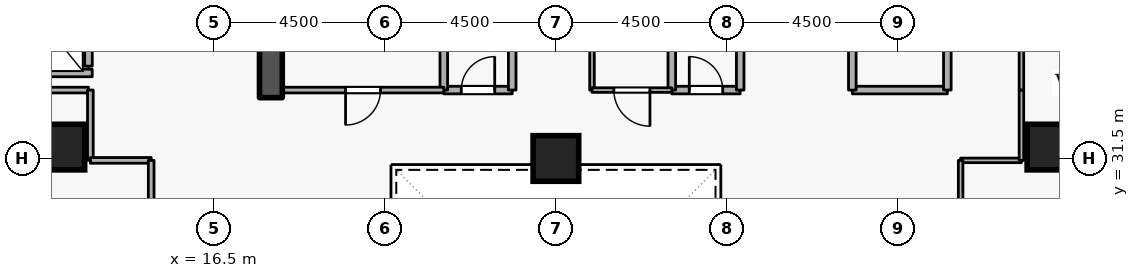
"""IFC4 building model, lengths in metres.
Left out: names, types, materials, properties, quantities, classifications, styles, units other than length and angle.
Written with IfcOpenShell. Run it as: python <this file> out.ifc"""

import sys

from ifc_helpers import new_model, si_unit, direction, frame, frame_2d, origin, origin_2d, place, context, subcontext, project, spatial, rectangle, extrude, element, fill, save


model = new_model("IFC4")
c1 = context("Model", 3, precision=1e-05, world=origin(), true_north=direction((0.0, 1.0)))
c2 = subcontext(c1, "Body", "Model", "MODEL_VIEW")
j1 = project(units=[si_unit("LENGTHUNIT", "METRE"), si_unit("PLANEANGLEUNIT", "RADIAN")], contexts=[c1])
p1 = place(None, origin())
s1 = spatial("IfcSite", under=j1, at=p1, CompositionType="ELEMENT")
p2 = place(p1, origin())
s2 = spatial("IfcBuilding", under=s1, at=p2, CompositionType="ELEMENT")
p3 = place(p2, frame((0.0, 0.0, 75.9)))
s3 = spatial("IfcBuildingStorey", under=s2, at=p3, CompositionType="ELEMENT", Elevation=75.9)
p4 = place(p3, frame((18.0, 33.1, 0.0), z_axis=(0.0, 0.0, 1.0), x_axis=(0.0, 1.0, 0.0)))
e1 = element("IfcWall", 1, at=p4, inside=s3, PredefinedType="SHEAR", context=c2, shape_type="SweptSolid", body=[
    extrude(rectangle(XDim=5.7, YDim=0.6, at=frame_2d((2.85, 0.0))), origin(), (0.0, 0.0, 1.0), 4.2),
])
for number, where, z_axis, x_axis in (
    (2, (12.5, 31.8, 0.0), (0.0, 0.0, 1.0), (1.0, 0.0, 0.0)),
    (3, (38.5, 31.8, 0.0), (0.0, 0.0, 1.0), (1.0, 0.0, 0.0)),
    (4, (25.5, 31.5, 0.0), (0.0, 0.0, 1.0), (1.0, 0.0, 0.0)),
):
    element("IfcColumn", number, at=place(p3, frame(where, z_axis=z_axis, x_axis=x_axis)), inside=s3, PredefinedType="COLUMN", context=c2, shape_type="SweptSolid", body=[
        extrude(rectangle(XDim=1.2, YDim=1.2, at=origin_2d()), origin(), (0.0, 0.0, 1.0), 4.2),
    ])
p5 = place(p3, frame((13.2, 33.93, 0.0), z_axis=(0.0, 0.0, 1.0), x_axis=(0.0, 1.0, 0.0)))
e5 = element("IfcWall", 5, at=p5, inside=s3, PredefinedType="STANDARD", context=c2, shape_type="SweptSolid", body=[
    extrude(rectangle(XDim=1.94, YDim=0.2, at=frame_2d((0.97, 0.0))), origin(), (0.0, 0.0, 1.0), 3.94),
])
p6 = place(p5, frame((0.46, 0.0, 0.0)))
e6 = element("IfcOpeningElement", 6, at=p6, cuts=e5, PredefinedType="OPENING", context=c2, shape_type="SweptSolid", body=[
    extrude(rectangle(XDim=1.02, YDim=2.06, at=frame_2d((0.51, 1.03))), frame((0.0, 0.11, 0.0), z_axis=(0.0, -1.0, 0.0), x_axis=(1.0, 0.0, 0.0)), (0.0, 0.0, 1.0), 0.22),
])
p7 = place(p3, frame((11.002, 33.75, 0.0), z_axis=(0.0, 0.0, 1.0), x_axis=(1.0, 0.0, 0.0)))
e7 = element("IfcWall", 7, at=p7, inside=s3, PredefinedType="STANDARD", context=c2, shape_type="SweptSolid", body=[
    extrude(rectangle(XDim=2.296, YDim=0.2, at=frame_2d((1.148, 0.0))), origin(), (0.0, 0.0, 1.0), 3.94),
])
p8 = place(p3, frame((33.3, 33.3, 0.0), z_axis=(0.0, 0.0, 1.0), x_axis=(1.0, 0.0, 0.0)))
e8 = element("IfcWall", 8, at=p8, inside=s3, PredefinedType="STANDARD", context=c2, shape_type="SweptSolid", body=[
    extrude(rectangle(XDim=2.5, YDim=0.2, at=frame_2d((1.25, 0.0))), origin(), (0.0, 0.0, 1.0), 3.94),
])
p9 = place(p3, frame((35.8, 33.3, 0.0), z_axis=(0.0, 0.0, 1.0), x_axis=(0.0, 1.0, 0.0)))
e9 = element("IfcWall", 9, at=p9, inside=s3, PredefinedType="STANDARD", context=c2, shape_type="SweptSolid", body=[
    extrude(rectangle(XDim=5.7, YDim=0.2, at=frame_2d((2.85, 0.0))), origin(), (0.0, 0.0, 1.0), 3.94),
])
p10 = place(p9, frame((2.275, 0.0, 0.0)))
e10 = element("IfcOpeningElement", 10, at=p10, cuts=e9, PredefinedType="OPENING", context=c2, shape_type="SweptSolid", body=[
    extrude(rectangle(XDim=1.15, YDim=2.1, at=frame_2d((0.575, 1.05))), frame((0.0, 0.11, 0.0), z_axis=(0.0, -1.0, 0.0), x_axis=(1.0, 0.0, 0.0)), (0.0, 0.0, 1.0), 0.22),
])
p11 = place(p3, frame((33.3, 35.6, 0.0), z_axis=(0.0, 0.0, 1.0), x_axis=(0.0, -1.0, 0.0)))
e11 = element("IfcWall", 11, at=p11, inside=s3, PredefinedType="STANDARD", context=c2, shape_type="SweptSolid", body=[
    extrude(rectangle(XDim=2.3, YDim=0.2, at=frame_2d((1.15, 0.0))), origin(), (0.0, 0.0, 1.0), 3.145),
])
p12 = place(p3, frame((22.55, 33.3, 0.0), z_axis=(0.0, 0.0, 1.0), x_axis=(1.0, 0.0, 0.0)))
e12 = element("IfcWall", 12, at=p12, inside=s3, PredefinedType="STANDARD", context=c2, shape_type="SweptSolid", body=[
    extrude(rectangle(XDim=1.8, YDim=0.2, at=frame_2d((0.9, 0.0))), origin(), (0.0, 0.0, 1.0), 3.94),
])
p13 = place(p12, frame((0.46, 0.0, 0.0)))
e13 = element("IfcOpeningElement", 13, at=p13, cuts=e12, PredefinedType="OPENING", context=c2, shape_type="SweptSolid", body=[
    extrude(rectangle(XDim=0.88, YDim=2.04, at=frame_2d((0.44, 1.02))), frame((0.0, 0.11, 0.0), z_axis=(0.0, -1.0, 0.0), x_axis=(1.0, 0.0, 0.0)), (0.0, 0.0, 1.0), 0.22),
])
for number, where, z_axis, x_axis in (
    (14, (24.35, 33.3, 0.0), (0.0, 0.0, 1.0), (0.0, 1.0, 0.0)),
    (15, (22.55, 35.35, 0.0), (0.0, 0.0, 1.0), (0.0, -1.0, 0.0)),
):
    element("IfcWall", number, at=place(p3, frame(where, z_axis=z_axis, x_axis=x_axis)), inside=s3, PredefinedType="STANDARD", context=c2, shape_type="SweptSolid", body=[
        extrude(rectangle(XDim=2.05, YDim=0.2, at=frame_2d((1.025, 0.0))), origin(), (0.0, 0.0, 1.0), 3.94),
    ])
p14 = place(p3, frame((28.55, 33.3, 0.0), z_axis=(0.0, 0.0, 1.0), x_axis=(1.0, 0.0, 0.0)))
e16 = element("IfcWall", 16, at=p14, inside=s3, PredefinedType="STANDARD", context=c2, shape_type="SweptSolid", body=[
    extrude(rectangle(XDim=1.8, YDim=0.2, at=frame_2d((0.9, 0.0))), origin(), (0.0, 0.0, 1.0), 3.94),
])
p15 = place(p14, frame((0.46, 0.0, 0.0)))
e17 = element("IfcOpeningElement", 17, at=p15, cuts=e16, PredefinedType="OPENING", context=c2, shape_type="SweptSolid", body=[
    extrude(rectangle(XDim=0.88, YDim=2.04, at=frame_2d((0.44, 1.02))), frame((0.0, 0.11, 0.0), z_axis=(0.0, -1.0, 0.0), x_axis=(1.0, 0.0, 0.0)), (0.0, 0.0, 1.0), 0.22),
])
for number, where, z_axis, x_axis in (
    (18, (30.35, 33.3, 0.0), (0.0, 0.0, 1.0), (0.0, 1.0, 0.0)),
    (19, (28.55, 35.35, 0.0), (0.0, 0.0, 1.0), (0.0, -1.0, 0.0)),
):
    element("IfcWall", number, at=place(p3, frame(where, z_axis=z_axis, x_axis=x_axis)), inside=s3, PredefinedType="STANDARD", context=c2, shape_type="SweptSolid", body=[
        extrude(rectangle(XDim=2.05, YDim=0.2, at=frame_2d((1.025, 0.0))), origin(), (0.0, 0.0, 1.0), 3.94),
    ])
p16 = place(p3, frame((22.55, 33.3, 0.0), z_axis=(0.0, 0.0, 1.0), x_axis=(-1.0, 0.0, 0.0)))
e20 = element("IfcWall", 20, at=p16, inside=s3, PredefinedType="PARTITIONING", context=c2, shape_type="SweptSolid", body=[
    extrude(rectangle(XDim=4.25, YDim=0.15, at=frame_2d((2.125, 0.0))), origin(), (0.0, 0.0, 1.0), 3.94),
])
p17 = place(p16, frame((1.665, 0.0, 0.0)))
e21 = element("IfcOpeningElement", 21, at=p17, cuts=e20, PredefinedType="OPENING", context=c2, shape_type="SweptSolid", body=[
    extrude(rectangle(XDim=0.92, YDim=2.08, at=frame_2d((0.46, 1.04))), frame((0.0, 0.085, 0.0), z_axis=(0.0, -1.0, 0.0), x_axis=(1.0, 0.0, 0.0)), (0.0, 0.0, 1.0), 0.17),
])
p18 = place(p3, frame((26.45, 33.3, 0.0), z_axis=(0.0, 0.0, 1.0), x_axis=(0.0, 1.0, 0.0)))
e22 = element("IfcWall", 22, at=p18, inside=s3, PredefinedType="PARTITIONING", context=c2, shape_type="SweptSolid", body=[
    extrude(rectangle(XDim=2.05, YDim=0.12, at=frame_2d((1.025, 0.0))), origin(), (0.0, 0.0, 1.0), 3.94),
])
p19 = place(p3, frame((28.55, 33.3, 0.0), z_axis=(0.0, 0.0, 1.0), x_axis=(-1.0, 0.0, 0.0)))
e23 = element("IfcWall", 23, at=p19, inside=s3, PredefinedType="PARTITIONING", context=c2, shape_type="SweptSolid", body=[
    extrude(rectangle(XDim=2.1, YDim=0.12, at=frame_2d((1.05, 0.0))), origin(), (0.0, 0.0, 1.0), 3.94),
])
p20 = place(p19, frame((0.575, 0.0, 0.0)))
e24 = element("IfcOpeningElement", 24, at=p20, cuts=e23, PredefinedType="OPENING", context=c2, shape_type="SweptSolid", body=[
    extrude(rectangle(XDim=0.95, YDim=2.1, at=frame_2d((0.475, 1.05))), frame((0.0, 0.07, 0.0), z_axis=(0.0, -1.0, 0.0), x_axis=(1.0, 0.0, 0.0)), (0.0, 0.0, 1.0), 0.14),
])
p21 = place(p3, frame((10.9, 33.3, 0.0), z_axis=(0.0, 0.0, 1.0), x_axis=(1.0, 0.0, 0.0)))
e25 = element("IfcWall", 25, at=p21, inside=s3, PredefinedType="PARTITIONING", context=c2, shape_type="SweptSolid", body=[
    extrude(rectangle(XDim=2.3, YDim=0.15, at=frame_2d((1.15, 0.0))), origin(), (0.0, 0.0, 1.0), 3.94),
])
p22 = place(p3, frame((13.25, 33.3, 0.0), z_axis=(0.0, 0.0, 1.0), x_axis=(0.0, -1.0, 0.0)))
e26 = element("IfcWall", 26, at=p22, inside=s3, PredefinedType="PARTITIONING", context=c2, shape_type="SweptSolid", body=[
    extrude(rectangle(XDim=1.85, YDim=0.15, at=frame_2d((0.925, 0.0))), origin(), (0.0, 0.0, 1.0), 3.94),
])
p23 = place(p3, frame((13.25, 31.45, 0.0), z_axis=(0.0, 0.0, 1.0), x_axis=(1.0, 0.0, 0.0)))
e27 = element("IfcWall", 27, at=p23, inside=s3, PredefinedType="PARTITIONING", context=c2, shape_type="SweptSolid", body=[
    extrude(rectangle(XDim=1.6, YDim=0.15, at=frame_2d((0.8, 0.0))), origin(), (0.0, 0.0, 1.0), 3.94),
])
p24 = place(p3, frame((14.85, 31.45, 0.0), z_axis=(0.0, 0.0, 1.0), x_axis=(0.0, -1.0, 0.0)))
e28 = element("IfcWall", 28, at=p24, inside=s3, PredefinedType="PARTITIONING", context=c2, shape_type="SweptSolid", body=[
    extrude(rectangle(XDim=4.45, YDim=0.15, at=frame_2d((2.225, 0.0))), origin(), (0.0, 0.0, 1.0), 3.94),
])
p25 = place(p24, frame((1.575, 0.0, 0.0)))
e29 = element("IfcOpeningElement", 29, at=p25, cuts=e28, PredefinedType="OPENING", context=c2, shape_type="SweptSolid", body=[
    extrude(rectangle(XDim=1.3, YDim=2.12, at=frame_2d((0.65, 1.06))), frame((0.0, 0.085, 0.0), z_axis=(0.0, -1.0, 0.0), x_axis=(1.0, 0.0, 0.0)), (0.0, 0.0, 1.0), 0.17),
])
p26 = place(p3, frame((36.15, 31.45, 0.0), z_axis=(0.0, 0.0, 1.0), x_axis=(1.0, 0.0, 0.0)))
e30 = element("IfcWall", 30, at=p26, inside=s3, PredefinedType="PARTITIONING", context=c2, shape_type="SweptSolid", body=[
    extrude(rectangle(XDim=1.6, YDim=0.12, at=frame_2d((0.8, 0.0))), origin(), (0.0, 0.0, 1.0), 3.94),
])
p27 = place(p3, frame((37.75, 31.45, 0.0), z_axis=(0.0, 0.0, 1.0), x_axis=(0.0, 1.0, 0.0)))
e31 = element("IfcWall", 31, at=p27, inside=s3, PredefinedType="PARTITIONING", context=c2, shape_type="SweptSolid", body=[
    extrude(rectangle(XDim=1.85, YDim=0.12, at=frame_2d((0.925, 0.0))), origin(), (0.0, 0.0, 1.0), 3.94),
])
p28 = place(p3, frame((37.75, 33.3, 0.0), z_axis=(0.0, 0.0, 1.0), x_axis=(0.0, 1.0, 0.0)))
e32 = element("IfcWall", 32, at=p28, inside=s3, PredefinedType="PARTITIONING", context=c2, shape_type="SweptSolid", body=[
    extrude(rectangle(XDim=9.35, YDim=0.12, at=frame_2d((4.675, 0.0))), origin(), (0.0, 0.0, 1.0), 3.94),
])
p29 = place(p28, frame((4.15, 0.0, 0.0)))
e33 = element("IfcOpeningElement", 33, at=p29, cuts=e32, PredefinedType="OPENING", context=c2, shape_type="SweptSolid", body=[
    extrude(rectangle(XDim=1.05, YDim=2.1, at=frame_2d((0.525, 1.05))), frame((0.0, 0.07, 0.0), z_axis=(0.0, -1.0, 0.0), x_axis=(1.0, 0.0, 0.0)), (0.0, 0.0, 1.0), 0.14),
])
p30 = place(p3, frame((36.15, 27.0, 0.0), z_axis=(0.0, 0.0, 1.0), x_axis=(0.0, 1.0, 0.0)))
e34 = element("IfcWall", 34, at=p30, inside=s3, PredefinedType="PARTITIONING", context=c2, shape_type="SweptSolid", body=[
    extrude(rectangle(XDim=4.45, YDim=0.12, at=frame_2d((2.225, 0.0))), origin(), (0.0, 0.0, 1.0), 3.94),
])
p31 = place(p13, origin())
e35 = element("IfcDoor", 35, at=p31, inside=s3, OperationType="SINGLE_SWING_RIGHT", PredefinedType="DOOR", context=c2, shape_type="SweptSolid", body=[
    extrude(rectangle(XDim=0.88, YDim=2.04, at=frame_2d((0.44, 1.02))), frame((0.0, 0.025, 0.0), z_axis=(0.0, -1.0, 0.0), x_axis=(1.0, 0.0, 0.0)), (0.0, 0.0, 1.0), 0.05),
])
fill(e13, e35)
p32 = place(p15, origin())
e36 = element("IfcDoor", 36, at=p32, inside=s3, OperationType="SINGLE_SWING_LEFT", PredefinedType="DOOR", context=c2, shape_type="SweptSolid", body=[
    extrude(rectangle(XDim=0.88, YDim=2.04, at=frame_2d((0.44, 1.02))), frame((0.0, 0.025, 0.0), z_axis=(0.0, -1.0, 0.0), x_axis=(1.0, 0.0, 0.0)), (0.0, 0.0, 1.0), 0.05),
])
fill(e17, e36)
p33 = place(p17, origin())
e37 = element("IfcDoor", 37, at=p33, inside=s3, OperationType="SINGLE_SWING_RIGHT", PredefinedType="DOOR", context=c2, shape_type="SweptSolid", body=[
    extrude(rectangle(XDim=0.92, YDim=2.08, at=frame_2d((0.46, 1.04))), frame((0.0, 0.025, 0.0), z_axis=(0.0, -1.0, 0.0), x_axis=(1.0, 0.0, 0.0)), (0.0, 0.0, 1.0), 0.05),
])
fill(e21, e37)
p34 = place(p20, origin())
e38 = element("IfcDoor", 38, at=p34, inside=s3, OperationType="SINGLE_SWING_LEFT", PredefinedType="DOOR", context=c2, shape_type="SweptSolid", body=[
    extrude(rectangle(XDim=0.95, YDim=2.1, at=frame_2d((0.475, 1.05))), frame((0.0, 0.025, 0.0), z_axis=(0.0, -1.0, 0.0), x_axis=(1.0, 0.0, 0.0)), (0.0, 0.0, 1.0), 0.05),
])
fill(e24, e38)
save(model, sys.argv[1])
